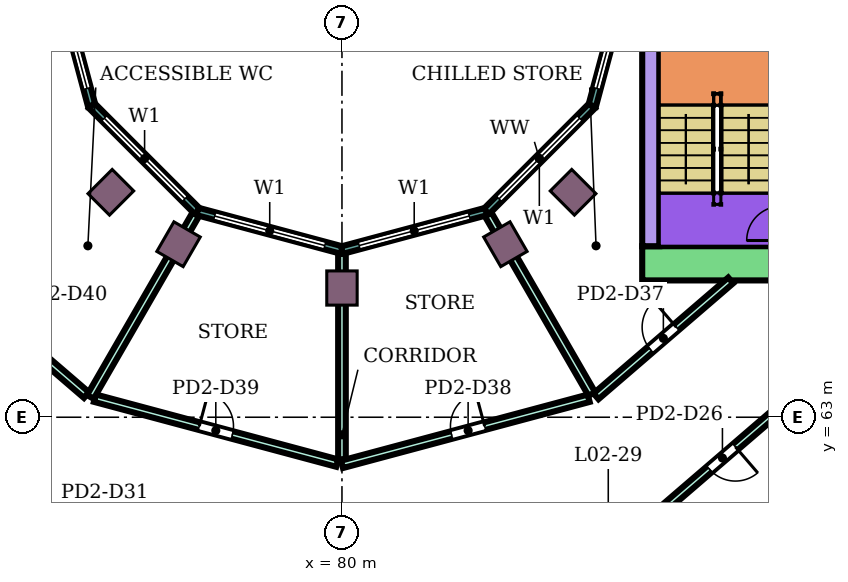
"""IFC4 building model, lengths in metres.
Left out: names, types, materials, properties, quantities, classifications, styles, units other than length and angle.
Written with IfcOpenShell. Run it as: python <this file> out.ifc"""

import sys

from ifc_helpers import new_model, si_unit, direction, frame, frame_2d, origin, origin_2d, place, context, subcontext, project, spatial, rectangle, extrude, element, fill, save


model = new_model("IFC4")
c1 = context("Model", 3, precision=1e-05, world=origin(), true_north=direction((0.0, 1.0)))
c2 = subcontext(c1, "Body", "Model", "MODEL_VIEW")
j1 = project(units=[si_unit("LENGTHUNIT", "METRE"), si_unit("PLANEANGLEUNIT", "RADIAN")], contexts=[c1])
p1 = place(None, origin())
s1 = spatial("IfcSite", under=j1, at=p1, CompositionType="ELEMENT")
p2 = place(p1, origin())
s2 = spatial("IfcBuilding", under=s1, at=p2, CompositionType="ELEMENT")
p3 = place(p2, frame((0.0, 0.0, 12.4)))
s3 = spatial("IfcBuildingStorey", under=s2, at=p3, CompositionType="ELEMENT", Elevation=12.4)
for number, where, z_axis, x_axis in (
    (1, (73.919, 68.919, 0.0), (0.0, 0.0, 1.0), (-0.707, -0.707, 0.0)),
    (2, (75.7, 67.552, 0.0), (0.0, 0.0, 1.0), (-0.5, -0.866, 0.0)),
    (3, (80.0, 66.4, 0.0), (0.0, 0.0, 1.0), (0.0, -1.0, 0.0)),
    (4, (84.3, 67.552, 0.0), (0.0, 0.0, 1.0), (0.5, -0.866, 0.0)),
    (5, (86.081, 68.919, 0.0), (0.0, 0.0, 1.0), (0.707, -0.707, 0.0)),
):
    element("IfcColumn", number, at=place(p3, frame(where, z_axis=z_axis, x_axis=x_axis)), inside=s3, PredefinedType="COLUMN", context=c2, shape_type="SweptSolid", body=[
        extrude(rectangle(XDim=0.9, YDim=0.8, at=origin_2d()), origin(), (0.0, 0.0, 1.0), 5.4),
    ])
p4 = place(p3, frame((87.9, 67.05, 0.0), z_axis=(0.0, 0.0, 1.0), x_axis=(1.0, 0.0, 0.0)))
e6 = element("IfcWall", 6, at=p4, inside=s3, PredefinedType="SHEAR", context=c2, shape_type="SweptSolid", body=[
    extrude(rectangle(XDim=14.6, YDim=0.9, at=frame_2d((7.3, 0.0))), origin(), (0.0, 0.0, 1.0), 4.95),
])
p5 = place(p4, frame((4.2, 0.0, 0.0)))
e7 = element("IfcOpeningElement", 7, at=p5, cuts=e6, PredefinedType="OPENING", context=c2, shape_type="SweptSolid", body=[
    extrude(rectangle(XDim=2.4, YDim=2.4, at=frame_2d((1.2, 1.2))), frame((0.0, 0.46, 0.0), z_axis=(0.0, -1.0, 0.0), x_axis=(1.0, 0.0, 0.0)), (0.0, 0.0, 1.0), 0.92),
])
p6 = place(p3, frame((88.125, 67.5, 0.0), z_axis=(0.0, 0.0, 1.0), x_axis=(0.0, 1.0, 0.0)))
e8 = element("IfcWall", 8, at=p6, inside=s3, PredefinedType="SHEAR", context=c2, shape_type="SweptSolid", body=[
    extrude(rectangle(XDim=7.5, YDim=0.45, at=frame_2d((3.75, 0.0))), origin(), (0.0, 0.0, 1.0), 4.95),
])
p7 = place(p3, frame((72.396, 75.0, 0.0), z_axis=(0.0, 0.0, 1.0), x_axis=(0.258789828301, -0.965933654434, 0.0)))
e9 = element("IfcWall", 9, at=p7, inside=s3, PredefinedType="NOTDEFINED", context=c2, shape_type="SweptSolid", body=[
    extrude(rectangle(XDim=3.936, YDim=0.2, at=frame_2d((1.968, 0.0))), origin(), (0.0, 0.0, 1.0), 5.4),
])
p8 = place(p7, frame((0.468, 0.0, 0.9)))
e10 = element("IfcOpeningElement", 10, at=p8, cuts=e9, PredefinedType="OPENING", context=c2, shape_type="SweptSolid", body=[
    extrude(rectangle(XDim=3.0, YDim=2.3, at=frame_2d((1.5, 1.15))), frame((0.0, 0.11, 0.0), z_axis=(0.0, -1.0, 0.0), x_axis=(1.0, 0.0, 0.0)), (0.0, 0.0, 1.0), 0.22),
])
p9 = place(p3, frame((73.415, 71.198, 0.0), z_axis=(0.0, 0.0, 1.0), x_axis=(0.707106781187, -0.707106781187, 0.0)))
e11 = element("IfcWall", 11, at=p9, inside=s3, PredefinedType="NOTDEFINED", context=c2, shape_type="SweptSolid", body=[
    extrude(rectangle(XDim=3.936, YDim=0.2, at=frame_2d((1.968, 0.0))), origin(), (0.0, 0.0, 1.0), 5.4),
])
p10 = place(p9, frame((0.468, 0.0, 0.9)))
e12 = element("IfcOpeningElement", 12, at=p10, cuts=e11, PredefinedType="OPENING", context=c2, shape_type="SweptSolid", body=[
    extrude(rectangle(XDim=3.0, YDim=2.3, at=frame_2d((1.5, 1.15))), frame((0.0, 0.11, 0.0), z_axis=(0.0, -1.0, 0.0), x_axis=(1.0, 0.0, 0.0)), (0.0, 0.0, 1.0), 0.22),
])
p11 = place(p3, frame((76.198, 68.415, 0.0), z_axis=(0.0, 0.0, 1.0), x_axis=(0.965933654434, -0.258789828301, 0.0)))
e13 = element("IfcWall", 13, at=p11, inside=s3, PredefinedType="NOTDEFINED", context=c2, shape_type="SweptSolid", body=[
    extrude(rectangle(XDim=3.936, YDim=0.2, at=frame_2d((1.968, 0.0))), origin(), (0.0, 0.0, 1.0), 5.4),
])
p12 = place(p11, frame((0.468, 0.0, 0.9)))
e14 = element("IfcOpeningElement", 14, at=p12, cuts=e13, PredefinedType="OPENING", context=c2, shape_type="SweptSolid", body=[
    extrude(rectangle(XDim=3.0, YDim=2.3, at=frame_2d((1.5, 1.15))), frame((0.0, 0.11, 0.0), z_axis=(0.0, -1.0, 0.0), x_axis=(1.0, 0.0, 0.0)), (0.0, 0.0, 1.0), 0.22),
])
p13 = place(p3, frame((80.0, 67.396, 0.0), z_axis=(0.0, 0.0, 1.0), x_axis=(0.965933654434, 0.258789828301, 0.0)))
e15 = element("IfcWall", 15, at=p13, inside=s3, PredefinedType="NOTDEFINED", context=c2, shape_type="SweptSolid", body=[
    extrude(rectangle(XDim=3.936, YDim=0.2, at=frame_2d((1.968, 0.0))), origin(), (0.0, 0.0, 1.0), 5.4),
])
p14 = place(p13, frame((0.468, 0.0, 0.9)))
e16 = element("IfcOpeningElement", 16, at=p14, cuts=e15, PredefinedType="OPENING", context=c2, shape_type="SweptSolid", body=[
    extrude(rectangle(XDim=3.0, YDim=2.3, at=frame_2d((1.5, 1.15))), frame((0.0, 0.11, 0.0), z_axis=(0.0, -1.0, 0.0), x_axis=(1.0, 0.0, 0.0)), (0.0, 0.0, 1.0), 0.22),
])
p15 = place(p3, frame((83.802, 68.415, 0.0), z_axis=(0.0, 0.0, 1.0), x_axis=(0.707106781187, 0.707106781187, 0.0)))
e17 = element("IfcWall", 17, at=p15, inside=s3, PredefinedType="NOTDEFINED", context=c2, shape_type="SweptSolid", body=[
    extrude(rectangle(XDim=3.936, YDim=0.2, at=frame_2d((1.968, 0.0))), origin(), (0.0, 0.0, 1.0), 5.4),
])
p16 = place(p15, frame((0.468, 0.0, 0.9)))
e18 = element("IfcOpeningElement", 18, at=p16, cuts=e17, PredefinedType="OPENING", context=c2, shape_type="SweptSolid", body=[
    extrude(rectangle(XDim=3.0, YDim=2.3, at=frame_2d((1.5, 1.15))), frame((0.0, 0.11, 0.0), z_axis=(0.0, -1.0, 0.0), x_axis=(1.0, 0.0, 0.0)), (0.0, 0.0, 1.0), 0.22),
])
p17 = place(p3, frame((86.585, 71.198, 0.0), z_axis=(0.0, 0.0, 1.0), x_axis=(0.258789828301, 0.965933654434, 0.0)))
e19 = element("IfcWall", 19, at=p17, inside=s3, PredefinedType="NOTDEFINED", context=c2, shape_type="SweptSolid", body=[
    extrude(rectangle(XDim=3.936, YDim=0.2, at=frame_2d((1.968, 0.0))), origin(), (0.0, 0.0, 1.0), 5.4),
])
p18 = place(p17, frame((0.468, 0.0, 0.9)))
e20 = element("IfcOpeningElement", 20, at=p18, cuts=e19, PredefinedType="OPENING", context=c2, shape_type="SweptSolid", body=[
    extrude(rectangle(XDim=3.0, YDim=2.3, at=frame_2d((1.5, 1.15))), frame((0.0, 0.11, 0.0), z_axis=(0.0, -1.0, 0.0), x_axis=(1.0, 0.0, 0.0)), (0.0, 0.0, 1.0), 0.22),
])
p19 = place(p3, frame((69.771, 66.6, 0.0), z_axis=(0.0, 0.0, 1.0), x_axis=(0.758040611529, -0.652207352974, 0.0)))
e21 = element("IfcWall", 21, at=p19, inside=s3, PredefinedType="PARTITIONING", context=c2, shape_type="SweptSolid", body=[
    extrude(rectangle(XDim=4.625, YDim=0.2, at=frame_2d((2.312, 0.0))), origin(), (0.0, 0.0, 1.0), 4.95),
])
p20 = place(p19, frame((1.887, 0.0, 0.0)))
e22 = element("IfcOpeningElement", 22, at=p20, cuts=e21, PredefinedType="OPENING", context=c2, shape_type="SweptSolid", body=[
    extrude(rectangle(XDim=0.9, YDim=2.1, at=frame_2d((0.45, 1.05))), frame((0.0, 0.11, 0.0), z_axis=(0.0, -1.0, 0.0), x_axis=(1.0, 0.0, 0.0)), (0.0, 0.0, 1.0), 0.22),
])
p21 = place(p3, frame((73.499, 63.502, 0.0), z_axis=(0.0, 0.0, 1.0), x_axis=(0.965923617359, -0.258827288799, 0.0)))
e23 = element("IfcWall", 23, at=p21, inside=s3, PredefinedType="PARTITIONING", context=c2, shape_type="SweptSolid", body=[
    extrude(rectangle(XDim=6.601, YDim=0.2, at=frame_2d((3.3, 0.0))), origin(), (0.0, 0.0, 1.0), 4.95),
])
p22 = place(p21, frame((2.844, 0.0, 0.0)))
e24 = element("IfcOpeningElement", 24, at=p22, cuts=e23, PredefinedType="OPENING", context=c2, shape_type="SweptSolid", body=[
    extrude(rectangle(XDim=0.9, YDim=2.1, at=frame_2d((0.45, 1.05))), frame((0.0, 0.11, 0.0), z_axis=(0.0, -1.0, 0.0), x_axis=(1.0, 0.0, 0.0)), (0.0, 0.0, 1.0), 0.22),
])
p23 = place(p3, frame((73.379, 63.534, 0.0), z_axis=(0.0, 0.0, 1.0), x_axis=(0.500033892615, 0.86600583499, 0.0)))
e25 = element("IfcWall", 25, at=p23, inside=s3, PredefinedType="PARTITIONING", context=c2, shape_type="SweptSolid", body=[
    extrude(rectangle(XDim=5.542, YDim=0.2, at=frame_2d((2.771, 0.0))), origin(), (0.0, 0.0, 1.0), 4.95),
])
p24 = place(p3, frame((80.0, 61.89, 0.0), z_axis=(0.0, 0.0, 1.0), x_axis=(0.0, 1.0, 0.0)))
e26 = element("IfcWall", 26, at=p24, inside=s3, PredefinedType="PARTITIONING", context=c2, shape_type="SweptSolid", body=[
    extrude(rectangle(XDim=5.411, YDim=0.2, at=frame_2d((2.706, 0.0))), origin(), (0.0, 0.0, 1.0), 4.95),
])
p25 = place(p3, frame((80.0, 61.76, 0.0), z_axis=(0.0, 0.0, 1.0), x_axis=(0.965932810031, 0.258792980017, 0.0)))
e27 = element("IfcWall", 27, at=p25, inside=s3, PredefinedType="PARTITIONING", context=c2, shape_type="SweptSolid", body=[
    extrude(rectangle(XDim=6.721, YDim=0.2, at=frame_2d((3.36, 0.0))), origin(), (0.0, 0.0, 1.0), 4.95),
])
p26 = place(p25, frame((2.987, 0.0, 0.0)))
e28 = element("IfcOpeningElement", 28, at=p26, cuts=e27, PredefinedType="OPENING", context=c2, shape_type="SweptSolid", body=[
    extrude(rectangle(XDim=0.9, YDim=2.1, at=frame_2d((0.45, 1.05))), frame((0.0, 0.11, 0.0), z_axis=(0.0, -1.0, 0.0), x_axis=(1.0, 0.0, 0.0)), (0.0, 0.0, 1.0), 0.22),
])
p27 = place(p3, frame((83.849, 68.333, 0.0), z_axis=(0.0, 0.0, 1.0), x_axis=(0.500006734102, -0.866021515814, 0.0)))
e29 = element("IfcWall", 29, at=p27, inside=s3, PredefinedType="PARTITIONING", context=c2, shape_type="SweptSolid", body=[
    extrude(rectangle(XDim=5.452, YDim=0.2, at=frame_2d((2.726, 0.0))), origin(), (0.0, 0.0, 1.0), 4.95),
])
p28 = place(p3, frame((86.685, 63.551, 0.0), z_axis=(0.0, 0.0, 1.0), x_axis=(0.758049900748, 0.652196556244, 0.0)))
e30 = element("IfcWall", 30, at=p28, inside=s3, PredefinedType="PARTITIONING", context=c2, shape_type="SweptSolid", body=[
    extrude(rectangle(XDim=4.675, YDim=0.2, at=frame_2d((2.337, 0.0))), origin(), (0.0, 0.0, 1.0), 4.95),
])
p29 = place(p28, frame((1.887, 0.0, 0.0)))
e31 = element("IfcOpeningElement", 31, at=p29, cuts=e30, PredefinedType="OPENING", context=c2, shape_type="SweptSolid", body=[
    extrude(rectangle(XDim=0.9, YDim=2.1, at=frame_2d((0.45, 1.05))), frame((0.0, 0.11, 0.0), z_axis=(0.0, -1.0, 0.0), x_axis=(1.0, 0.0, 0.0)), (0.0, 0.0, 1.0), 0.22),
])
p30 = place(p3, frame((88.436, 60.573, 0.0), z_axis=(0.0, 0.0, 1.0), x_axis=(0.758186248639, 0.652038045189, 0.0)))
e32 = element("IfcWall", 32, at=p30, inside=s3, PredefinedType="PARTITIONING", context=c2, shape_type="SweptSolid", body=[
    extrude(rectangle(XDim=6.882, YDim=0.2, at=frame_2d((3.441, 0.0))), origin(), (0.0, 0.0, 1.0), 4.95),
])
p31 = place(p30, frame((5.135, 0.0, 0.0)))
e33 = element("IfcOpeningElement", 33, at=p31, cuts=e32, PredefinedType="OPENING", context=c2, shape_type="SweptSolid", body=[
    extrude(rectangle(XDim=0.9, YDim=2.1, at=frame_2d((0.45, 1.05))), frame((0.0, 0.11, 0.0), z_axis=(0.0, -1.0, 0.0), x_axis=(1.0, 0.0, 0.0)), (0.0, 0.0, 1.0), 0.22),
])
p32 = place(p30, frame((1.627, 0.0, 0.0)))
e34 = element("IfcOpeningElement", 34, at=p32, cuts=e32, PredefinedType="OPENING", context=c2, shape_type="SweptSolid", body=[
    extrude(rectangle(XDim=0.9, YDim=2.1, at=frame_2d((0.45, 1.05))), frame((0.0, 0.11, 0.0), z_axis=(0.0, -1.0, 0.0), x_axis=(1.0, 0.0, 0.0)), (0.0, 0.0, 1.0), 0.22),
])
p33 = place(p8, origin())
e35 = element("IfcWindow", 35, at=p33, inside=s3, PartitioningType="SINGLE_PANEL", PredefinedType="WINDOW", context=c2, shape_type="SweptSolid", body=[
    extrude(rectangle(XDim=3.0, YDim=2.3, at=frame_2d((1.5, 1.15))), frame((0.0, 0.03, 0.0), z_axis=(0.0, -1.0, 0.0), x_axis=(1.0, 0.0, 0.0)), (0.0, 0.0, 1.0), 0.06),
])
fill(e10, e35)
p34 = place(p10, origin())
e36 = element("IfcWindow", 36, at=p34, inside=s3, PartitioningType="SINGLE_PANEL", PredefinedType="WINDOW", context=c2, shape_type="SweptSolid", body=[
    extrude(rectangle(XDim=3.0, YDim=2.3, at=frame_2d((1.5, 1.15))), frame((0.0, 0.03, 0.0), z_axis=(0.0, -1.0, 0.0), x_axis=(1.0, 0.0, 0.0)), (0.0, 0.0, 1.0), 0.06),
])
fill(e12, e36)
p35 = place(p12, origin())
e37 = element("IfcWindow", 37, at=p35, inside=s3, PartitioningType="SINGLE_PANEL", PredefinedType="WINDOW", context=c2, shape_type="SweptSolid", body=[
    extrude(rectangle(XDim=3.0, YDim=2.3, at=frame_2d((1.5, 1.15))), frame((0.0, 0.03, 0.0), z_axis=(0.0, -1.0, 0.0), x_axis=(1.0, 0.0, 0.0)), (0.0, 0.0, 1.0), 0.06),
])
fill(e14, e37)
p36 = place(p14, origin())
e38 = element("IfcWindow", 38, at=p36, inside=s3, PartitioningType="SINGLE_PANEL", PredefinedType="WINDOW", context=c2, shape_type="SweptSolid", body=[
    extrude(rectangle(XDim=3.0, YDim=2.3, at=frame_2d((1.5, 1.15))), frame((0.0, 0.03, 0.0), z_axis=(0.0, -1.0, 0.0), x_axis=(1.0, 0.0, 0.0)), (0.0, 0.0, 1.0), 0.06),
])
fill(e16, e38)
p37 = place(p16, origin())
e39 = element("IfcWindow", 39, at=p37, inside=s3, PartitioningType="SINGLE_PANEL", PredefinedType="WINDOW", context=c2, shape_type="SweptSolid", body=[
    extrude(rectangle(XDim=3.0, YDim=2.3, at=frame_2d((1.5, 1.15))), frame((0.0, 0.03, 0.0), z_axis=(0.0, -1.0, 0.0), x_axis=(1.0, 0.0, 0.0)), (0.0, 0.0, 1.0), 0.06),
])
fill(e18, e39)
p38 = place(p18, origin())
e40 = element("IfcWindow", 40, at=p38, inside=s3, PartitioningType="SINGLE_PANEL", PredefinedType="WINDOW", context=c2, shape_type="SweptSolid", body=[
    extrude(rectangle(XDim=3.0, YDim=2.3, at=frame_2d((1.5, 1.15))), frame((0.0, 0.03, 0.0), z_axis=(0.0, -1.0, 0.0), x_axis=(1.0, 0.0, 0.0)), (0.0, 0.0, 1.0), 0.06),
])
fill(e20, e40)
p39 = place(p32, frame((0.9, 0.0, 0.0), z_axis=(0.0, 0.0, 1.0), x_axis=(-1.0, 0.0, 0.0)))
e41 = element("IfcDoor", 41, at=p39, inside=s3, OperationType="SINGLE_SWING_LEFT", PredefinedType="DOOR", context=c2, shape_type="SweptSolid", body=[
    extrude(rectangle(XDim=0.9, YDim=2.1, at=frame_2d((0.45, 1.05))), frame((0.0, 0.025, 0.0), z_axis=(0.0, -1.0, 0.0), x_axis=(1.0, 0.0, 0.0)), (0.0, 0.0, 1.0), 0.05),
])
fill(e34, e41)
p40 = place(p29, origin())
e42 = element("IfcDoor", 42, at=p40, inside=s3, OperationType="SINGLE_SWING_RIGHT", PredefinedType="DOOR", context=c2, shape_type="SweptSolid", body=[
    extrude(rectangle(XDim=0.9, YDim=2.1, at=frame_2d((0.45, 1.05))), frame((0.0, 0.025, 0.0), z_axis=(0.0, -1.0, 0.0), x_axis=(1.0, 0.0, 0.0)), (0.0, 0.0, 1.0), 0.05),
])
fill(e31, e42)
p41 = place(p26, origin())
e43 = element("IfcDoor", 43, at=p41, inside=s3, OperationType="SINGLE_SWING_RIGHT", PredefinedType="DOOR", context=c2, shape_type="SweptSolid", body=[
    extrude(rectangle(XDim=0.9, YDim=2.1, at=frame_2d((0.45, 1.05))), frame((0.0, 0.025, 0.0), z_axis=(0.0, -1.0, 0.0), x_axis=(1.0, 0.0, 0.0)), (0.0, 0.0, 1.0), 0.05),
])
fill(e28, e43)
p42 = place(p22, origin())
e44 = element("IfcDoor", 44, at=p42, inside=s3, OperationType="SINGLE_SWING_LEFT", PredefinedType="DOOR", context=c2, shape_type="SweptSolid", body=[
    extrude(rectangle(XDim=0.9, YDim=2.1, at=frame_2d((0.45, 1.05))), frame((0.0, 0.025, 0.0), z_axis=(0.0, -1.0, 0.0), x_axis=(1.0, 0.0, 0.0)), (0.0, 0.0, 1.0), 0.05),
])
fill(e24, e44)
save(model, sys.argv[1])
